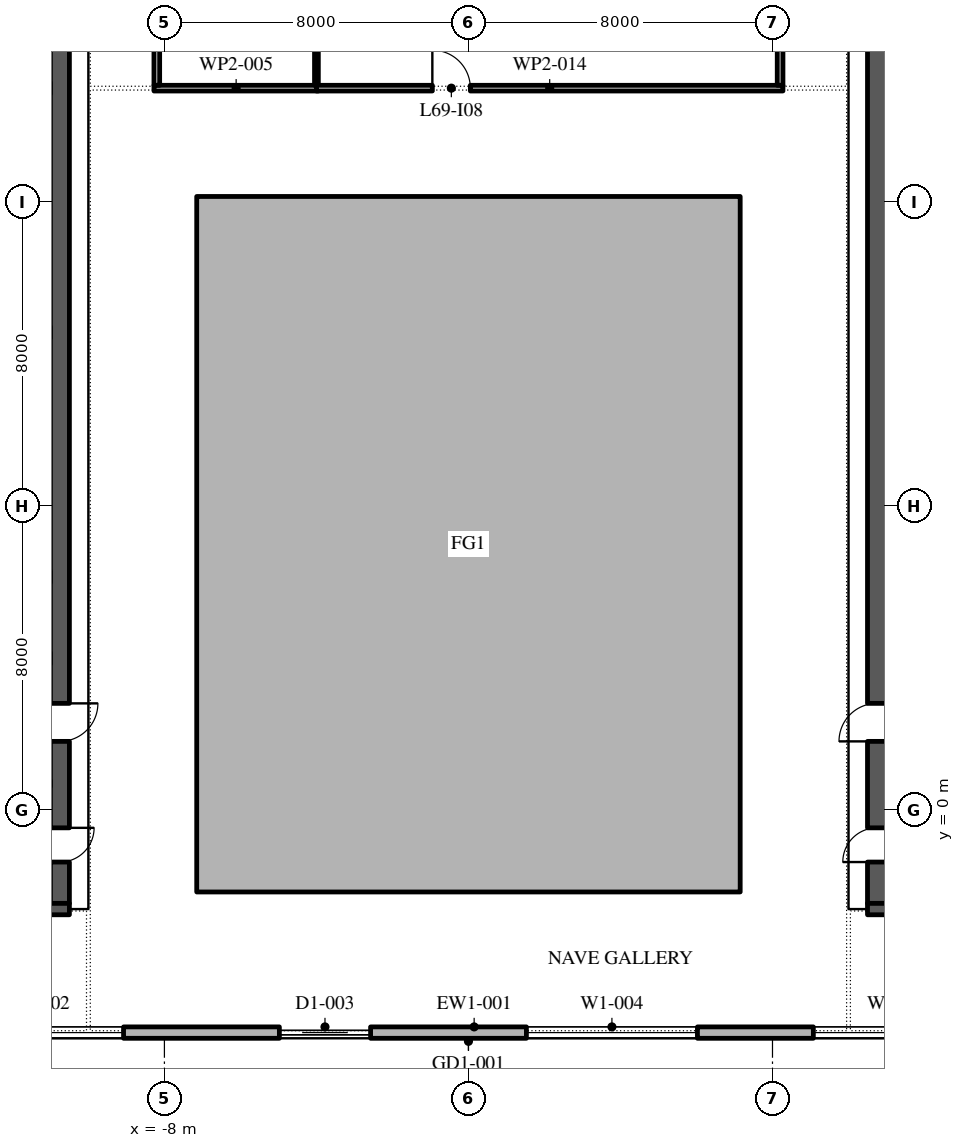
"""IFC4 building model, lengths in metres.
Left out: names, types, materials, properties, quantities, classifications, styles, units other than length and angle.
Written with IfcOpenShell. Run it as: python <this file> out.ifc"""

import sys

from ifc_helpers import new_model, si_unit, direction, frame, frame_2d, origin, place, context, subcontext, project, spatial, polyline, rectangle, outline, extrude, element, fill, save


model = new_model("IFC4")
c1 = context("Model", 3, precision=1e-05, world=origin(), true_north=direction((0.0, 1.0)))
c2 = subcontext(c1, "Body", "Model", "MODEL_VIEW")
j1 = project(units=[si_unit("LENGTHUNIT", "METRE"), si_unit("PLANEANGLEUNIT", "RADIAN")], contexts=[c1])
p1 = place(None, origin())
s1 = spatial("IfcSite", under=j1, at=p1, CompositionType="ELEMENT")
p2 = place(p1, origin())
s2 = spatial("IfcBuilding", under=s1, at=p2, CompositionType="ELEMENT")
p3 = place(p2, frame((0.0, 0.0, 317.4)))
s3 = spatial("IfcBuildingStorey", under=s2, at=p3, CompositionType="ELEMENT", Elevation=317.4)
p4 = place(p3, origin())
e1 = element("IfcWall", 1, at=p4, inside=s3, PredefinedType="STANDARD", context=c2, shape_type="SweptSolid", body=[
    extrude(outline(polyline([(-7.15, -2.15), (7.15, -2.15), (7.15, 16.15), (-7.15, 16.15), (-7.15, -2.15)]), holes=[polyline([(-7.0, -2.0), (-7.0, 16.0), (7.0, 16.0), (7.0, -2.0), (-7.0, -2.0)])]), origin(), (0.0, 0.0, 1.0), 4.0),
])
p5 = place(p3, frame((-22.35, -5.85, 0.0), z_axis=(0.0, 0.0, 1.0), x_axis=(1.0, 0.0, 0.0)))
e2 = element("IfcWall", 2, at=p5, inside=s3, PredefinedType="STANDARD", context=c2, shape_type="SweptSolid", body=[
    extrude(rectangle(XDim=45.0, YDim=0.3, at=frame_2d((22.5, 0.0))), origin(), (0.0, 0.0, 1.0), 4.0),
])
p6 = place(p5, frame((1.375, 0.0, 0.45)))
e3 = element("IfcOpeningElement", 3, at=p6, cuts=e2, PredefinedType="OPENING", context=c2, shape_type="SweptSolid", body=[
    extrude(rectangle(XDim=4.5, YDim=3.05, at=frame_2d((2.25, 1.525))), frame((0.0, 0.16, 0.0), z_axis=(0.0, -1.0, 0.0), x_axis=(1.0, 0.0, 0.0)), (0.0, 0.0, 1.0), 0.32),
])
p7 = place(p5, frame((8.775, 0.0, 0.45)))
e4 = element("IfcOpeningElement", 4, at=p7, cuts=e2, PredefinedType="OPENING", context=c2, shape_type="SweptSolid", body=[
    extrude(rectangle(XDim=4.5, YDim=3.05, at=frame_2d((2.25, 1.525))), frame((0.0, 0.16, 0.0), z_axis=(0.0, -1.0, 0.0), x_axis=(1.0, 0.0, 0.0)), (0.0, 0.0, 1.0), 0.32),
])
p8 = place(p5, frame((17.375, 0.0, 0.0)))
e5 = element("IfcOpeningElement", 5, at=p8, cuts=e2, PredefinedType="OPENING", context=c2, shape_type="SweptSolid", body=[
    extrude(rectangle(XDim=2.4, YDim=3.5, at=frame_2d((1.2, 1.75))), frame((0.0, 0.16, 0.0), z_axis=(0.0, -1.0, 0.0), x_axis=(1.0, 0.0, 0.0)), (0.0, 0.0, 1.0), 0.32),
])
p9 = place(p5, frame((23.875, 0.0, 0.45)))
e6 = element("IfcOpeningElement", 6, at=p9, cuts=e2, PredefinedType="OPENING", context=c2, shape_type="SweptSolid", body=[
    extrude(rectangle(XDim=4.5, YDim=3.05, at=frame_2d((2.25, 1.525))), frame((0.0, 0.16, 0.0), z_axis=(0.0, -1.0, 0.0), x_axis=(1.0, 0.0, 0.0)), (0.0, 0.0, 1.0), 0.32),
])
p10 = place(p5, frame((31.425, 0.0, 0.45)))
e7 = element("IfcOpeningElement", 7, at=p10, cuts=e2, PredefinedType="OPENING", context=c2, shape_type="SweptSolid", body=[
    extrude(rectangle(XDim=4.5, YDim=3.05, at=frame_2d((2.25, 1.525))), frame((0.0, 0.16, 0.0), z_axis=(0.0, -1.0, 0.0), x_axis=(1.0, 0.0, 0.0)), (0.0, 0.0, 1.0), 0.32),
])
p11 = place(p5, frame((38.975, 0.0, 0.45)))
e8 = element("IfcOpeningElement", 8, at=p11, cuts=e2, PredefinedType="OPENING", context=c2, shape_type="SweptSolid", body=[
    extrude(rectangle(XDim=4.5, YDim=3.05, at=frame_2d((2.25, 1.525))), frame((0.0, 0.16, 0.0), z_axis=(0.0, -1.0, 0.0), x_axis=(1.0, 0.0, 0.0)), (0.0, 0.0, 1.0), 0.32),
])
p12 = place(p3, frame((-10.75, -2.45, 0.0), z_axis=(0.0, 0.0, 1.0), x_axis=(0.0, 1.0, 0.0)))
e9 = element("IfcWall", 9, at=p12, inside=s3, PredefinedType="SHEAR", context=c2, shape_type="SweptSolid", body=[
    extrude(rectangle(XDim=27.9, YDim=0.5, at=frame_2d((13.95, 0.0))), origin(), (0.0, 0.0, 1.0), 4.0),
])
p13 = place(p12, frame((23.65, 0.0, 0.0)))
e10 = element("IfcOpeningElement", 10, at=p13, cuts=e9, PredefinedType="OPENING", context=c2, shape_type="SweptSolid", body=[
    extrude(rectangle(XDim=2.4, YDim=2.1, at=frame_2d((1.2, 1.05))), frame((0.0, 0.26, 0.0), z_axis=(0.0, -1.0, 0.0), x_axis=(1.0, 0.0, 0.0)), (0.0, 0.0, 1.0), 0.52),
])
p14 = place(p12, frame((1.087, 0.0, 0.0)))
e11 = element("IfcOpeningElement", 11, at=p14, cuts=e9, PredefinedType="OPENING", context=c2, shape_type="SweptSolid", body=[
    extrude(rectangle(XDim=0.9, YDim=2.1, at=frame_2d((0.45, 1.05))), frame((0.0, 0.26, 0.0), z_axis=(0.0, -1.0, 0.0), x_axis=(1.0, 0.0, 0.0)), (0.0, 0.0, 1.0), 0.52),
])
p15 = place(p12, frame((4.262, 0.0, 0.0)))
e12 = element("IfcOpeningElement", 12, at=p15, cuts=e9, PredefinedType="OPENING", context=c2, shape_type="SweptSolid", body=[
    extrude(rectangle(XDim=1.0, YDim=2.1, at=frame_2d((0.5, 1.05))), frame((0.0, 0.26, 0.0), z_axis=(0.0, -1.0, 0.0), x_axis=(1.0, 0.0, 0.0)), (0.0, 0.0, 1.0), 0.52),
])
p16 = place(p3, frame((-21.5, -2.6, 0.0), z_axis=(0.0, 0.0, 1.0), x_axis=(1.0, 0.0, 0.0)))
e13 = element("IfcWall", 13, at=p16, inside=s3, PredefinedType="SHEAR", context=c2, shape_type="SweptSolid", body=[
    extrude(rectangle(XDim=11.0, YDim=0.3, at=frame_2d((5.5, 0.0))), origin(), (0.0, 0.0, 1.0), 4.0),
])
p17 = place(p3, frame((10.75, -2.45, 0.0), z_axis=(0.0, 0.0, 1.0), x_axis=(0.0, 1.0, 0.0)))
e14 = element("IfcWall", 14, at=p17, inside=s3, PredefinedType="SHEAR", context=c2, shape_type="SweptSolid", body=[
    extrude(rectangle(XDim=27.9, YDim=0.5, at=frame_2d((13.95, 0.0))), origin(), (0.0, 0.0, 1.0), 4.0),
])
p18 = place(p17, frame((23.65, 0.0, 0.0)))
e15 = element("IfcOpeningElement", 15, at=p18, cuts=e14, PredefinedType="OPENING", context=c2, shape_type="SweptSolid", body=[
    extrude(rectangle(XDim=2.4, YDim=2.1, at=frame_2d((1.2, 1.05))), frame((0.0, 0.26, 0.0), z_axis=(0.0, -1.0, 0.0), x_axis=(1.0, 0.0, 0.0)), (0.0, 0.0, 1.0), 0.52),
])
p19 = place(p17, frame((1.087, 0.0, 0.0)))
e16 = element("IfcOpeningElement", 16, at=p19, cuts=e14, PredefinedType="OPENING", context=c2, shape_type="SweptSolid", body=[
    extrude(rectangle(XDim=0.9, YDim=2.1, at=frame_2d((0.45, 1.05))), frame((0.0, 0.26, 0.0), z_axis=(0.0, -1.0, 0.0), x_axis=(1.0, 0.0, 0.0)), (0.0, 0.0, 1.0), 0.52),
])
p20 = place(p17, frame((4.262, 0.0, 0.0)))
e17 = element("IfcOpeningElement", 17, at=p20, cuts=e14, PredefinedType="OPENING", context=c2, shape_type="SweptSolid", body=[
    extrude(rectangle(XDim=1.0, YDim=2.1, at=frame_2d((0.5, 1.05))), frame((0.0, 0.26, 0.0), z_axis=(0.0, -1.0, 0.0), x_axis=(1.0, 0.0, 0.0)), (0.0, 0.0, 1.0), 0.52),
])
p21 = place(p3, frame((10.5, -2.6, 0.0), z_axis=(0.0, 0.0, 1.0), x_axis=(1.0, 0.0, 0.0)))
e18 = element("IfcWall", 18, at=p21, inside=s3, PredefinedType="SHEAR", context=c2, shape_type="SweptSolid", body=[
    extrude(rectangle(XDim=11.0, YDim=0.3, at=frame_2d((5.5, 0.0))), origin(), (0.0, 0.0, 1.0), 4.0),
])
p22 = place(p3, frame((-8.275, 19.0, 0.0), z_axis=(0.0, 0.0, 1.0), x_axis=(1.0, 0.0, 0.0)))
e19 = element("IfcWall", 19, at=p22, inside=s3, PredefinedType="PARTITIONING", context=c2, shape_type="SweptSolid", body=[
    extrude(rectangle(XDim=4.325, YDim=0.15, at=frame_2d((2.163, 0.0))), origin(), (0.0, 0.0, 1.0), 4.0),
])
p23 = place(p3, frame((-8.2, 25.55, 0.0), z_axis=(0.0, 0.0, 1.0), x_axis=(0.0, -1.0, 0.0)))
e20 = element("IfcWall", 20, at=p23, inside=s3, PredefinedType="PARTITIONING", context=c2, shape_type="SweptSolid", body=[
    extrude(rectangle(XDim=6.475, YDim=0.15, at=frame_2d((3.238, 0.0))), origin(), (0.0, 0.0, 1.0), 4.0),
])
p24 = place(p23, frame((2.9, 0.0, 0.0)))
e21 = element("IfcOpeningElement", 21, at=p24, cuts=e20, PredefinedType="OPENING", context=c2, shape_type="SweptSolid", body=[
    extrude(rectangle(XDim=1.0, YDim=2.1, at=frame_2d((0.5, 1.05))), frame((0.0, 0.085, 0.0), z_axis=(0.0, -1.0, 0.0), x_axis=(1.0, 0.0, 0.0)), (0.0, 0.0, 1.0), 0.17),
])
p25 = place(p3, frame((-4.0, 19.075, 0.0), z_axis=(0.0, 0.0, 1.0), x_axis=(0.0, 1.0, 0.0)))
e22 = element("IfcWall", 22, at=p25, inside=s3, PredefinedType="PARTITIONING", context=c2, shape_type="SweptSolid", body=[
    extrude(rectangle(XDim=6.475, YDim=0.1, at=frame_2d((3.238, 0.0))), origin(), (0.0, 0.0, 1.0), 4.0),
])
p26 = place(p3, frame((-4.0, 19.0, 0.0), z_axis=(0.0, 0.0, 1.0), x_axis=(1.0, 0.0, 0.0)))
e23 = element("IfcWall", 23, at=p26, inside=s3, PredefinedType="PARTITIONING", context=c2, shape_type="SweptSolid", body=[
    extrude(rectangle(XDim=12.275, YDim=0.15, at=frame_2d((6.137, 0.0))), origin(), (0.0, 0.0, 1.0), 4.0),
])
p27 = place(p26, frame((3.05, 0.0, 0.0)))
e24 = element("IfcOpeningElement", 24, at=p27, cuts=e23, PredefinedType="OPENING", context=c2, shape_type="SweptSolid", body=[
    extrude(rectangle(XDim=1.0, YDim=2.1, at=frame_2d((0.5, 1.05))), frame((0.0, 0.085, 0.0), z_axis=(0.0, -1.0, 0.0), x_axis=(1.0, 0.0, 0.0)), (0.0, 0.0, 1.0), 0.17),
])
p28 = place(p3, frame((8.2, 19.075, 0.0), z_axis=(0.0, 0.0, 1.0), x_axis=(0.0, 1.0, 0.0)))
e25 = element("IfcWall", 25, at=p28, inside=s3, PredefinedType="PARTITIONING", context=c2, shape_type="SweptSolid", body=[
    extrude(rectangle(XDim=6.425, YDim=0.15, at=frame_2d((3.212, 0.0))), origin(), (0.0, 0.0, 1.0), 4.0),
])
p29 = place(p7, origin())
e26 = element("IfcWindow", 26, at=p29, inside=s3, PartitioningType="DOUBLE_PANEL_VERTICAL", PredefinedType="WINDOW", context=c2, shape_type="SweptSolid", body=[
    extrude(rectangle(XDim=4.5, YDim=3.05, at=frame_2d((2.25, 1.525))), frame((0.0, 0.03, 0.0), z_axis=(0.0, -1.0, 0.0), x_axis=(1.0, 0.0, 0.0)), (0.0, 0.0, 1.0), 0.06),
])
fill(e4, e26)
p30 = place(p8, origin())
e27 = element("IfcDoor", 27, at=p30, inside=s3, OperationType="DOUBLE_DOOR_SLIDING", PredefinedType="DOOR", context=c2, shape_type="SweptSolid", body=[
    extrude(rectangle(XDim=2.4, YDim=3.5, at=frame_2d((1.2, 1.75))), frame((0.0, 0.025, 0.0), z_axis=(0.0, -1.0, 0.0), x_axis=(1.0, 0.0, 0.0)), (0.0, 0.0, 1.0), 0.05),
])
fill(e5, e27)
p31 = place(p9, origin())
e28 = element("IfcWindow", 28, at=p31, inside=s3, PartitioningType="DOUBLE_PANEL_VERTICAL", PredefinedType="WINDOW", context=c2, shape_type="SweptSolid", body=[
    extrude(rectangle(XDim=4.5, YDim=3.05, at=frame_2d((2.25, 1.525))), frame((0.0, 0.03, 0.0), z_axis=(0.0, -1.0, 0.0), x_axis=(1.0, 0.0, 0.0)), (0.0, 0.0, 1.0), 0.06),
])
fill(e6, e28)
p32 = place(p10, origin())
e29 = element("IfcWindow", 29, at=p32, inside=s3, PartitioningType="DOUBLE_PANEL_VERTICAL", PredefinedType="WINDOW", context=c2, shape_type="SweptSolid", body=[
    extrude(rectangle(XDim=4.5, YDim=3.05, at=frame_2d((2.25, 1.525))), frame((0.0, 0.03, 0.0), z_axis=(0.0, -1.0, 0.0), x_axis=(1.0, 0.0, 0.0)), (0.0, 0.0, 1.0), 0.06),
])
fill(e7, e29)
p33 = place(p27, origin())
e30 = element("IfcDoor", 30, at=p33, inside=s3, OperationType="SINGLE_SWING_RIGHT", PredefinedType="DOOR", context=c2, shape_type="SweptSolid", body=[
    extrude(rectangle(XDim=1.0, YDim=2.1, at=frame_2d((0.5, 1.05))), frame((0.0, 0.025, 0.0), z_axis=(0.0, -1.0, 0.0), x_axis=(1.0, 0.0, 0.0)), (0.0, 0.0, 1.0), 0.05),
])
fill(e24, e30)
save(model, sys.argv[1])
